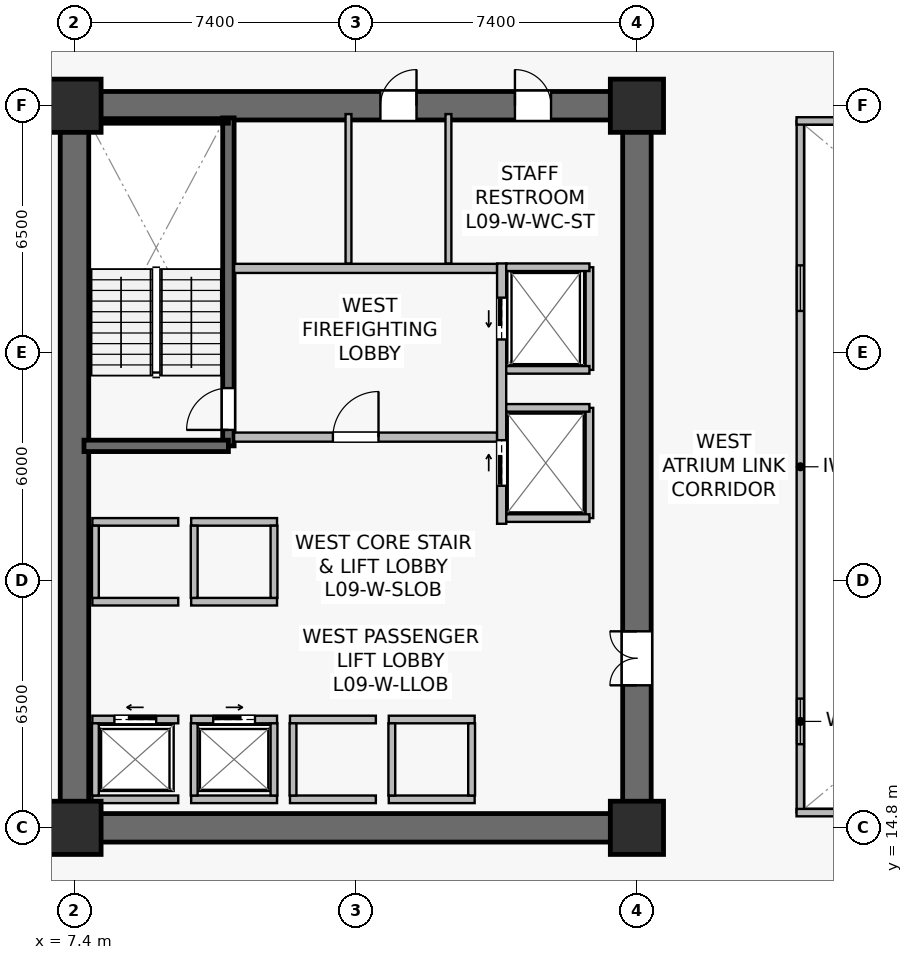
"""IFC4 building model, lengths in metres.
Left out: names, types, materials, properties, quantities, classifications, styles, units other than length and angle.
Written with IfcOpenShell. Run it as: python <this file> out.ifc"""

import sys

from ifc_helpers import new_model, si_unit, direction, frame, frame_2d, origin, origin_2d, place, context, subcontext, project, spatial, rectangle, extrude, source, transform, mapped, element, fill, save


model = new_model("IFC4")
c1 = context("Model", 3, precision=1e-05, world=origin(), true_north=direction((0.0, 1.0)))
c2 = subcontext(c1, "Body", "Model", "MODEL_VIEW")
j1 = project(units=[si_unit("LENGTHUNIT", "METRE"), si_unit("PLANEANGLEUNIT", "RADIAN")], contexts=[c1])
p1 = place(None, origin())
s1 = spatial("IfcSite", under=j1, at=p1, CompositionType="ELEMENT")
p2 = place(p1, origin())
s2 = spatial("IfcBuilding", under=s1, at=p2, CompositionType="ELEMENT")
p3 = place(p2, frame((0.0, 0.0, 37.5)))
s3 = spatial("IfcBuildingStorey", under=s2, at=p3, CompositionType="ELEMENT", Elevation=37.5)
p4 = place(p3, frame((7.025, 14.8, 0.0), z_axis=(0.0, 0.0, 1.0), x_axis=(1.0, 0.0, 0.0)))
e1 = element("IfcWall", 1, at=p4, inside=s3, PredefinedType="SHEAR", context=c2, shape_type="SweptSolid", body=[
    extrude(rectangle(XDim=15.55, YDim=0.75, at=frame_2d((7.775, 0.0))), origin(), (0.0, 0.0, 1.0), 3.78),
])
p5 = place(p3, frame((7.025, 33.8, 0.0), z_axis=(0.0, 0.0, 1.0), x_axis=(1.0, 0.0, 0.0)))
e2 = element("IfcWall", 2, at=p5, inside=s3, PredefinedType="SHEAR", context=c2, shape_type="SweptSolid", body=[
    extrude(rectangle(XDim=15.55, YDim=0.75, at=frame_2d((7.775, 0.0))), origin(), (0.0, 0.0, 1.0), 3.78),
])
p6 = place(p5, frame((8.425, 0.0, 0.0)))
e3 = element("IfcOpeningElement", 3, at=p6, cuts=e2, PredefinedType="OPENING", context=c2, shape_type="SweptSolid", body=[
    extrude(rectangle(XDim=0.95, YDim=2.15, at=frame_2d((0.475, 1.075))), frame((0.0, 0.385, 0.0), z_axis=(0.0, -1.0, 0.0), x_axis=(1.0, 0.0, 0.0)), (0.0, 0.0, 1.0), 0.77),
])
p7 = place(p5, frame((11.965, 0.0, 0.0)))
e4 = element("IfcOpeningElement", 4, at=p7, cuts=e2, PredefinedType="OPENING", context=c2, shape_type="SweptSolid", body=[
    extrude(rectangle(XDim=0.95, YDim=2.15, at=frame_2d((0.475, 1.075))), frame((0.0, 0.385, 0.0), z_axis=(0.0, -1.0, 0.0), x_axis=(1.0, 0.0, 0.0)), (0.0, 0.0, 1.0), 0.77),
])
p8 = place(p3, frame((7.4, 15.175, 0.0), z_axis=(0.0, 0.0, 1.0), x_axis=(0.0, 1.0, 0.0)))
e5 = element("IfcWall", 5, at=p8, inside=s3, PredefinedType="SHEAR", context=c2, shape_type="SweptSolid", body=[
    extrude(rectangle(XDim=18.25, YDim=0.75, at=frame_2d((9.125, 0.0))), origin(), (0.0, 0.0, 1.0), 3.78),
])
p9 = place(p3, frame((22.2, 15.175, 0.0), z_axis=(0.0, 0.0, 1.0), x_axis=(0.0, 1.0, 0.0)))
e6 = element("IfcWall", 6, at=p9, inside=s3, PredefinedType="SHEAR", context=c2, shape_type="SweptSolid", body=[
    extrude(rectangle(XDim=18.25, YDim=0.75, at=frame_2d((9.125, 0.0))), origin(), (0.0, 0.0, 1.0), 3.78),
])
p10 = place(p9, frame((3.375, 0.0, 0.0)))
e7 = element("IfcOpeningElement", 7, at=p10, cuts=e6, PredefinedType="OPENING", context=c2, shape_type="SweptSolid", body=[
    extrude(rectangle(XDim=1.42, YDim=2.2, at=frame_2d((0.71, 1.1))), frame((0.0, 0.385, 0.0), z_axis=(0.0, -1.0, 0.0), x_axis=(1.0, 0.0, 0.0)), (0.0, 0.0, 1.0), 0.77),
])
p11 = place(p3, frame((11.45, 24.85, 0.0), z_axis=(0.0, 0.0, 1.0), x_axis=(0.0, 1.0, 0.0)))
e8 = element("IfcWall", 8, at=p11, inside=s3, PredefinedType="SHEAR", context=c2, shape_type="SweptSolid", body=[
    extrude(rectangle(XDim=8.63, YDim=0.3, at=frame_2d((4.315, 0.0))), origin(), (0.0, 0.0, 1.0), 3.78),
])
p12 = place(p11, frame((0.42, 0.0, 0.0)))
e9 = element("IfcOpeningElement", 9, at=p12, cuts=e8, PredefinedType="OPENING", context=c2, shape_type="SweptSolid", body=[
    extrude(rectangle(XDim=1.1, YDim=2.15, at=frame_2d((0.55, 1.075))), frame((0.0, 0.16, 0.0), z_axis=(0.0, -1.0, 0.0), x_axis=(1.0, 0.0, 0.0)), (0.0, 0.0, 1.0), 0.32),
])
p13 = place(p3, frame((7.65, 24.85, 0.0), z_axis=(0.0, 0.0, 1.0), x_axis=(1.0, 0.0, 0.0)))
e10 = element("IfcWall", 10, at=p13, inside=s3, PredefinedType="SHEAR", context=c2, shape_type="SweptSolid", body=[
    extrude(rectangle(XDim=3.8, YDim=0.3, at=frame_2d((1.9, 0.0))), origin(), (0.0, 0.0, 1.0), 3.78),
])
p14 = place(p3, frame((7.73, 33.4, 0.0), z_axis=(0.0, 0.0, 1.0), x_axis=(1.0, 0.0, 0.0)))
e11 = element("IfcWall", 11, at=p14, inside=s3, PredefinedType="SOLIDWALL", context=c2, shape_type="SweptSolid", body=[
    extrude(rectangle(XDim=3.72, YDim=0.12, at=frame_2d((1.86, 0.0))), origin(), (0.0, 0.0, 1.0), 3.78),
])
m1 = source(origin(), c2, "Body", "SweptSolid", [
    extrude(rectangle(XDim=1.4, YDim=1.4, at=origin_2d()), origin(), (0.0, 0.0, 1.0), 4.1),
])
for number, where, z_axis, x_axis in (
    (12, (7.4, 14.8, 0.0), (0.0, 0.0, 1.0), (1.0, 0.0, 0.0)),
    (13, (22.2, 14.8, 0.0), (0.0, 0.0, 1.0), (1.0, 0.0, 0.0)),
    (14, (7.4, 33.8, 0.0), (0.0, 0.0, 1.0), (1.0, 0.0, 0.0)),
    (15, (22.2, 33.8, 0.0), (0.0, 0.0, 1.0), (1.0, 0.0, 0.0)),
):
    element("IfcColumn", number, at=place(p3, frame(where, z_axis=z_axis, x_axis=x_axis)), inside=s3, PredefinedType="COLUMN", context=c2, shape_type="MappedRepresentation", body=[
        mapped(m1, transform((0.0, 0.0, 0.0), scale=1.0)),
    ])
p15 = place(p3, frame((11.6, 25.08, 0.0), z_axis=(0.0, 0.0, 1.0), x_axis=(1.0, 0.0, 0.0)))
e16 = element("IfcWall", 16, at=p15, inside=s3, PredefinedType="SOLIDWALL", context=c2, shape_type="SweptSolid", body=[
    extrude(rectangle(XDim=6.92, YDim=0.24, at=frame_2d((3.46, 0.0))), origin(), (0.0, 0.0, 1.0), 3.065),
])
p16 = place(p15, frame((2.6, 0.0, 0.0)))
e17 = element("IfcOpeningElement", 17, at=p16, cuts=e16, PredefinedType="OPENING", context=c2, shape_type="SweptSolid", body=[
    extrude(rectangle(XDim=1.2, YDim=2.16, at=frame_2d((0.6, 1.08))), frame((0.0, 0.13, 0.0), z_axis=(0.0, -1.0, 0.0), x_axis=(1.0, 0.0, 0.0)), (0.0, 0.0, 1.0), 0.26),
])
p17 = place(p3, frame((11.6, 29.52, 0.0), z_axis=(0.0, 0.0, 1.0), x_axis=(1.0, 0.0, 0.0)))
e18 = element("IfcWall", 18, at=p17, inside=s3, PredefinedType="SOLIDWALL", context=c2, shape_type="SweptSolid", body=[
    extrude(rectangle(XDim=6.92, YDim=0.24, at=frame_2d((3.46, 0.0))), origin(), (0.0, 0.0, 1.0), 3.065),
])
p18 = place(p3, frame((18.64, 22.8, 0.0), z_axis=(0.0, 0.0, 1.0), x_axis=(0.0, 1.0, 0.0)))
e19 = element("IfcWall", 19, at=p18, inside=s3, PredefinedType="SOLIDWALL", context=c2, shape_type="SweptSolid", body=[
    extrude(rectangle(XDim=6.85, YDim=0.24, at=frame_2d((3.425, 0.0))), origin(), (0.0, 0.0, 1.0), 2.865),
])
p19 = place(p18, frame((4.85, 0.0, 0.0)))
e20 = element("IfcOpeningElement", 20, at=p19, cuts=e19, PredefinedType="OPENING", context=c2, shape_type="SweptSolid", body=[
    extrude(rectangle(XDim=1.1, YDim=2.22, at=frame_2d((0.55, 1.11))), frame((0.0, 0.13, 0.0), z_axis=(0.0, -1.0, 0.0), x_axis=(1.0, 0.0, 0.0)), (0.0, 0.0, 1.0), 0.26),
])
p20 = place(p18, frame((1.0, 0.0, 0.0)))
e21 = element("IfcOpeningElement", 21, at=p20, cuts=e19, PredefinedType="OPENING", context=c2, shape_type="SweptSolid", body=[
    extrude(rectangle(XDim=1.2, YDim=2.22, at=frame_2d((0.6, 1.11))), frame((0.0, 0.13, 0.0), z_axis=(0.0, -1.0, 0.0), x_axis=(1.0, 0.0, 0.0)), (0.0, 0.0, 1.0), 0.26),
])
p21 = place(p3, frame((7.87, 17.65, 0.0), z_axis=(0.0, 0.0, 1.0), x_axis=(1.0, 0.0, 0.0)))
e22 = element("IfcWall", 22, at=p21, inside=s3, PredefinedType="SOLIDWALL", context=c2, shape_type="SweptSolid", body=[
    extrude(rectangle(XDim=2.26, YDim=0.2, at=frame_2d((1.13, 0.0))), origin(), (0.0, 0.0, 1.0), 3.78),
])
p22 = place(p21, frame((0.58, 0.0, 0.0)))
e23 = element("IfcOpeningElement", 23, at=p22, cuts=e22, PredefinedType="OPENING", context=c2, shape_type="SweptSolid", body=[
    extrude(rectangle(XDim=1.1, YDim=2.22, at=frame_2d((0.55, 1.11))), frame((0.0, 0.11, 0.0), z_axis=(0.0, -1.0, 0.0), x_axis=(1.0, 0.0, 0.0)), (0.0, 0.0, 1.0), 0.22),
])
p23 = place(p3, frame((7.87, 15.55, 0.0), z_axis=(0.0, 0.0, 1.0), x_axis=(1.0, 0.0, 0.0)))
e24 = element("IfcWall", 24, at=p23, inside=s3, PredefinedType="SOLIDWALL", context=c2, shape_type="SweptSolid", body=[
    extrude(rectangle(XDim=2.26, YDim=0.2, at=frame_2d((1.13, 0.0))), origin(), (0.0, 0.0, 1.0), 3.78),
])
p24 = place(p3, frame((7.95, 15.65, 0.0), z_axis=(0.0, 0.0, 1.0), x_axis=(0.0, 1.0, 0.0)))
e25 = element("IfcWall", 25, at=p24, inside=s3, PredefinedType="SOLIDWALL", context=c2, shape_type="SweptSolid", body=[
    extrude(rectangle(XDim=1.9, YDim=0.18, at=frame_2d((0.95, 0.0))), origin(), (0.0, 0.0, 1.0), 3.78),
])
p25 = place(p3, frame((10.47, 17.65, 0.0), z_axis=(0.0, 0.0, 1.0), x_axis=(1.0, 0.0, 0.0)))
e26 = element("IfcWall", 26, at=p25, inside=s3, PredefinedType="SOLIDWALL", context=c2, shape_type="SweptSolid", body=[
    extrude(rectangle(XDim=2.26, YDim=0.2, at=frame_2d((1.13, 0.0))), origin(), (0.0, 0.0, 1.0), 3.78),
])
p26 = place(p25, frame((0.58, 0.0, 0.0)))
e27 = element("IfcOpeningElement", 27, at=p26, cuts=e26, PredefinedType="OPENING", context=c2, shape_type="SweptSolid", body=[
    extrude(rectangle(XDim=1.1, YDim=2.22, at=frame_2d((0.55, 1.11))), frame((0.0, 0.11, 0.0), z_axis=(0.0, -1.0, 0.0), x_axis=(1.0, 0.0, 0.0)), (0.0, 0.0, 1.0), 0.22),
])
p27 = place(p3, frame((10.47, 15.55, 0.0), z_axis=(0.0, 0.0, 1.0), x_axis=(1.0, 0.0, 0.0)))
e28 = element("IfcWall", 28, at=p27, inside=s3, PredefinedType="SOLIDWALL", context=c2, shape_type="SweptSolid", body=[
    extrude(rectangle(XDim=2.26, YDim=0.2, at=frame_2d((1.13, 0.0))), origin(), (0.0, 0.0, 1.0), 3.78),
])
for number, where, z_axis, x_axis in (
    (29, (10.55, 15.65, 0.0), (0.0, 0.0, 1.0), (0.0, 1.0, 0.0)),
    (30, (12.65, 15.65, 0.0), (0.0, 0.0, 1.0), (0.0, 1.0, 0.0)),
):
    element("IfcWall", number, at=place(p3, frame(where, z_axis=z_axis, x_axis=x_axis)), inside=s3, PredefinedType="SOLIDWALL", context=c2, shape_type="SweptSolid", body=[
        extrude(rectangle(XDim=1.9, YDim=0.18, at=frame_2d((0.95, 0.0))), origin(), (0.0, 0.0, 1.0), 3.78),
    ])
for number, where, z_axis, x_axis in (
    (31, (13.07, 17.65, 0.0), (0.0, 0.0, 1.0), (1.0, 0.0, 0.0)),
    (32, (13.07, 15.55, 0.0), (0.0, 0.0, 1.0), (1.0, 0.0, 0.0)),
):
    element("IfcWall", number, at=place(p3, frame(where, z_axis=z_axis, x_axis=x_axis)), inside=s3, PredefinedType="SOLIDWALL", context=c2, shape_type="SweptSolid", body=[
        extrude(rectangle(XDim=2.26, YDim=0.2, at=frame_2d((1.13, 0.0))), origin(), (0.0, 0.0, 1.0), 3.065),
    ])
p28 = place(p3, frame((13.15, 15.65, 0.0), z_axis=(0.0, 0.0, 1.0), x_axis=(0.0, 1.0, 0.0)))
e33 = element("IfcWall", 33, at=p28, inside=s3, PredefinedType="SOLIDWALL", context=c2, shape_type="SweptSolid", body=[
    extrude(rectangle(XDim=1.9, YDim=0.18, at=frame_2d((0.95, 0.0))), origin(), (0.0, 0.0, 1.0), 3.78),
])
for number, where, z_axis, x_axis in (
    (34, (15.67, 17.65, 0.0), (0.0, 0.0, 1.0), (1.0, 0.0, 0.0)),
    (35, (15.67, 15.55, 0.0), (0.0, 0.0, 1.0), (1.0, 0.0, 0.0)),
):
    element("IfcWall", number, at=place(p3, frame(where, z_axis=z_axis, x_axis=x_axis)), inside=s3, PredefinedType="SOLIDWALL", context=c2, shape_type="SweptSolid", body=[
        extrude(rectangle(XDim=2.26, YDim=0.2, at=frame_2d((1.13, 0.0))), origin(), (0.0, 0.0, 1.0), 3.78),
    ])
for number, where, z_axis, x_axis in (
    (36, (15.75, 15.65, 0.0), (0.0, 0.0, 1.0), (0.0, 1.0, 0.0)),
    (37, (17.85, 15.65, 0.0), (0.0, 0.0, 1.0), (0.0, 1.0, 0.0)),
):
    element("IfcWall", number, at=place(p3, frame(where, z_axis=z_axis, x_axis=x_axis)), inside=s3, PredefinedType="SOLIDWALL", context=c2, shape_type="SweptSolid", body=[
        extrude(rectangle(XDim=1.9, YDim=0.18, at=frame_2d((0.95, 0.0))), origin(), (0.0, 0.0, 1.0), 3.78),
    ])
for number, where, z_axis, x_axis in (
    (38, (7.87, 20.75, 0.0), (0.0, 0.0, 1.0), (1.0, 0.0, 0.0)),
    (39, (7.87, 22.85, 0.0), (0.0, 0.0, 1.0), (1.0, 0.0, 0.0)),
):
    element("IfcWall", number, at=place(p3, frame(where, z_axis=z_axis, x_axis=x_axis)), inside=s3, PredefinedType="SOLIDWALL", context=c2, shape_type="SweptSolid", body=[
        extrude(rectangle(XDim=2.26, YDim=0.2, at=frame_2d((1.13, 0.0))), origin(), (0.0, 0.0, 1.0), 3.78),
    ])
p29 = place(p3, frame((7.95, 20.85, 0.0), z_axis=(0.0, 0.0, 1.0), x_axis=(0.0, 1.0, 0.0)))
e40 = element("IfcWall", 40, at=p29, inside=s3, PredefinedType="SOLIDWALL", context=c2, shape_type="SweptSolid", body=[
    extrude(rectangle(XDim=1.9, YDim=0.18, at=frame_2d((0.95, 0.0))), origin(), (0.0, 0.0, 1.0), 3.78),
])
for number, where, z_axis, x_axis in (
    (41, (10.47, 20.75, 0.0), (0.0, 0.0, 1.0), (1.0, 0.0, 0.0)),
    (42, (10.47, 22.85, 0.0), (0.0, 0.0, 1.0), (1.0, 0.0, 0.0)),
):
    element("IfcWall", number, at=place(p3, frame(where, z_axis=z_axis, x_axis=x_axis)), inside=s3, PredefinedType="SOLIDWALL", context=c2, shape_type="SweptSolid", body=[
        extrude(rectangle(XDim=2.26, YDim=0.2, at=frame_2d((1.13, 0.0))), origin(), (0.0, 0.0, 1.0), 3.78),
    ])
for number, where, z_axis, x_axis in (
    (43, (10.55, 20.85, 0.0), (0.0, 0.0, 1.0), (0.0, 1.0, 0.0)),
    (44, (12.65, 20.85, 0.0), (0.0, 0.0, 1.0), (0.0, 1.0, 0.0)),
):
    element("IfcWall", number, at=place(p3, frame(where, z_axis=z_axis, x_axis=x_axis)), inside=s3, PredefinedType="SOLIDWALL", context=c2, shape_type="SweptSolid", body=[
        extrude(rectangle(XDim=1.9, YDim=0.18, at=frame_2d((0.95, 0.0))), origin(), (0.0, 0.0, 1.0), 3.78),
    ])
p30 = place(p3, frame((20.95, 26.85, 0.0), z_axis=(0.0, 0.0, 1.0), x_axis=(0.0, 1.0, 0.0)))
e45 = element("IfcWall", 45, at=p30, inside=s3, PredefinedType="SOLIDWALL", context=c2, shape_type="SweptSolid", body=[
    extrude(rectangle(XDim=2.7, YDim=0.2, at=frame_2d((1.35, 0.0))), origin(), (0.0, 0.0, 1.0), 3.78),
])
p31 = place(p3, frame((18.76, 29.55, 0.0), z_axis=(0.0, 0.0, 1.0), x_axis=(1.0, 0.0, 0.0)))
e46 = element("IfcWall", 46, at=p31, inside=s3, PredefinedType="SOLIDWALL", context=c2, shape_type="SweptSolid", body=[
    extrude(rectangle(XDim=2.19, YDim=0.2, at=frame_2d((1.095, 0.0))), origin(), (0.0, 0.0, 1.0), 3.78),
])
p32 = place(p3, frame((18.76, 26.85, 0.0), z_axis=(0.0, 0.0, 1.0), x_axis=(1.0, 0.0, 0.0)))
e47 = element("IfcWall", 47, at=p32, inside=s3, PredefinedType="SOLIDWALL", context=c2, shape_type="SweptSolid", body=[
    extrude(rectangle(XDim=2.19, YDim=0.2, at=frame_2d((1.095, 0.0))), origin(), (0.0, 0.0, 1.0), 3.177),
])
p33 = place(p3, frame((20.95, 22.95, 0.0), z_axis=(0.0, 0.0, 1.0), x_axis=(0.0, 1.0, 0.0)))
e48 = element("IfcWall", 48, at=p33, inside=s3, PredefinedType="SOLIDWALL", context=c2, shape_type="SweptSolid", body=[
    extrude(rectangle(XDim=2.9, YDim=0.2, at=frame_2d((1.45, 0.0))), origin(), (0.0, 0.0, 1.0), 2.865),
])
for number, where, z_axis, x_axis in (
    (49, (18.76, 25.85, 0.0), (0.0, 0.0, 1.0), (1.0, 0.0, 0.0)),
    (50, (18.76, 22.95, 0.0), (0.0, 0.0, 1.0), (1.0, 0.0, 0.0)),
):
    element("IfcWall", number, at=place(p3, frame(where, z_axis=z_axis, x_axis=x_axis)), inside=s3, PredefinedType="SOLIDWALL", context=c2, shape_type="SweptSolid", body=[
        extrude(rectangle(XDim=2.19, YDim=0.2, at=frame_2d((1.095, 0.0))), origin(), (0.0, 0.0, 1.0), 3.78),
    ])
p34 = place(p3, frame((14.61, 29.65, 0.0), z_axis=(0.0, 0.0, 1.0), x_axis=(0.0, 1.0, 0.0)))
e51 = element("IfcWall", 51, at=p34, inside=s3, PredefinedType="PLUMBINGWALL", context=c2, shape_type="SweptSolid", body=[
    extrude(rectangle(XDim=3.93, YDim=0.155, at=frame_2d((1.965, 0.0))), origin(), (0.0, 0.0, 1.0), 3.065),
])
p35 = place(p3, frame((17.24, 29.65, 0.0), z_axis=(0.0, 0.0, 1.0), x_axis=(0.0, 1.0, 0.0)))
e52 = element("IfcWall", 52, at=p35, inside=s3, PredefinedType="PLUMBINGWALL", context=c2, shape_type="SweptSolid", body=[
    extrude(rectangle(XDim=3.93, YDim=0.155, at=frame_2d((1.965, 0.0))), origin(), (0.0, 0.0, 1.0), 3.78),
])
p36 = place(p3, frame((26.5, 15.2, 0.0), z_axis=(0.0, 0.0, 1.0), x_axis=(0.0, 1.0, 0.0)))
e53 = element("IfcWall", 53, at=p36, inside=s3, PredefinedType="SOLIDWALL", context=c2, shape_type="SweptSolid", body=[
    extrude(rectangle(XDim=18.2, YDim=0.195, at=frame_2d((9.1, 0.0))), origin(), (0.0, 0.0, 1.0), 3.78),
])
p37 = place(p36, frame((1.8, 0.0, 0.9)))
e54 = element("IfcOpeningElement", 54, at=p37, cuts=e53, PredefinedType="OPENING", context=c2, shape_type="SweptSolid", body=[
    extrude(rectangle(XDim=1.2, YDim=1.35, at=frame_2d((0.6, 0.675))), frame((0.0, 0.107, 0.0), z_axis=(0.0, -1.0, 0.0), x_axis=(1.0, 0.0, 0.0)), (0.0, 0.0, 1.0), 0.215),
])
p38 = place(p36, frame((13.2, 0.0, 0.9)))
e55 = element("IfcOpeningElement", 55, at=p38, cuts=e53, PredefinedType="OPENING", context=c2, shape_type="SweptSolid", body=[
    extrude(rectangle(XDim=1.2, YDim=1.35, at=frame_2d((0.6, 0.675))), frame((0.0, 0.107, 0.0), z_axis=(0.0, -1.0, 0.0), x_axis=(1.0, 0.0, 0.0)), (0.0, 0.0, 1.0), 0.215),
])
for number, where, z_axis, x_axis in (
    (56, (26.4, 15.2, 0.0), (0.0, 0.0, 1.0), (1.0, 0.0, 0.0)),
    (57, (26.4, 33.4, 0.0), (0.0, 0.0, 1.0), (1.0, 0.0, 0.0)),
):
    element("IfcWall", number, at=place(p3, frame(where, z_axis=z_axis, x_axis=x_axis)), inside=s3, PredefinedType="SOLIDWALL", context=c2, shape_type="SweptSolid", body=[
        extrude(rectangle(XDim=22.0, YDim=0.195, at=frame_2d((11.0, 0.0))), origin(), (0.0, 0.0, 1.0), 3.78),
    ])
m2 = source(origin(), c2, "Body", "SweptSolid", [
    extrude(rectangle(XDim=1.2, YDim=1.35, at=frame_2d((0.6, 0.675))), frame((0.0, 0.03, 0.0), z_axis=(0.0, -1.0, 0.0), x_axis=(1.0, 0.0, 0.0)), (0.0, 0.0, 1.0), 0.06),
])
p39 = place(p37, origin())
e58 = element("IfcWindow", 58, at=p39, inside=s3, PartitioningType="SINGLE_PANEL", PredefinedType="WINDOW", context=c2, shape_type="MappedRepresentation", body=[
    mapped(m2, transform((0.0, 0.0, 0.0), scale=1.0)),
])
fill(e54, e58)
p40 = place(p38, origin())
e59 = element("IfcWindow", 59, at=p40, inside=s3, PartitioningType="SINGLE_PANEL", PredefinedType="WINDOW", context=c2, shape_type="MappedRepresentation", body=[
    mapped(m2, transform((0.0, 0.0, 0.0), scale=1.0)),
])
fill(e55, e59)
m3 = source(origin(), c2, "Body", "SweptSolid", [
    extrude(rectangle(XDim=1.1, YDim=2.15, at=frame_2d((0.55, 1.075))), frame((0.0, 0.025, 0.0), z_axis=(0.0, -1.0, 0.0), x_axis=(1.0, 0.0, 0.0)), (0.0, 0.0, 1.0), 0.05),
])
p41 = place(p12, origin())
e60 = element("IfcDoor", 60, at=p41, inside=s3, OperationType="SINGLE_SWING_LEFT", PredefinedType="DOOR", context=c2, shape_type="MappedRepresentation", body=[
    mapped(m3, transform((0.0, 0.0, 0.0), scale=1.0)),
])
fill(e9, e60)
m4 = source(origin(), c2, "Body", "SweptSolid", [
    extrude(rectangle(XDim=1.2, YDim=2.16, at=frame_2d((0.6, 1.08))), frame((0.0, 0.025, 0.0), z_axis=(0.0, -1.0, 0.0), x_axis=(1.0, 0.0, 0.0)), (0.0, 0.0, 1.0), 0.05),
])
p42 = place(p16, origin())
e61 = element("IfcDoor", 61, at=p42, inside=s3, OperationType="SINGLE_SWING_RIGHT", PredefinedType="DOOR", context=c2, shape_type="MappedRepresentation", body=[
    mapped(m4, transform((0.0, 0.0, 0.0), scale=1.0)),
])
fill(e17, e61)
m5 = source(origin(), c2, "Body", "SweptSolid", [
    extrude(rectangle(XDim=1.1, YDim=2.22, at=frame_2d((0.55, 1.11))), frame((0.0, 0.025, 0.0), z_axis=(0.0, -1.0, 0.0), x_axis=(1.0, 0.0, 0.0)), (0.0, 0.0, 1.0), 0.05),
])
p43 = place(p22, origin())
e62 = element("IfcDoor", 62, at=p43, inside=s3, OperationType="SLIDING_TO_LEFT", PredefinedType="USERDEFINED", context=c2, shape_type="MappedRepresentation", body=[
    mapped(m5, transform((0.0, 0.0, 0.0), scale=1.0)),
])
fill(e23, e62)
p44 = place(p26, origin())
e63 = element("IfcDoor", 63, at=p44, inside=s3, OperationType="SLIDING_TO_RIGHT", PredefinedType="USERDEFINED", context=c2, shape_type="MappedRepresentation", body=[
    mapped(m5, transform((0.0, 0.0, 0.0), scale=1.0)),
])
fill(e27, e63)
p45 = place(p19, origin())
e64 = element("IfcDoor", 64, at=p45, inside=s3, OperationType="SLIDING_TO_LEFT", PredefinedType="USERDEFINED", context=c2, shape_type="MappedRepresentation", body=[
    mapped(m5, transform((0.0, 0.0, 0.0), scale=1.0)),
])
fill(e20, e64)
m6 = source(origin(), c2, "Body", "SweptSolid", [
    extrude(rectangle(XDim=1.2, YDim=2.22, at=frame_2d((0.6, 1.11))), frame((0.0, 0.025, 0.0), z_axis=(0.0, -1.0, 0.0), x_axis=(1.0, 0.0, 0.0)), (0.0, 0.0, 1.0), 0.05),
])
p46 = place(p20, origin())
e65 = element("IfcDoor", 65, at=p46, inside=s3, OperationType="SLIDING_TO_RIGHT", PredefinedType="USERDEFINED", context=c2, shape_type="MappedRepresentation", body=[
    mapped(m6, transform((0.0, 0.0, 0.0), scale=1.0)),
])
fill(e21, e65)
m7 = source(origin(), c2, "Body", "SweptSolid", [
    extrude(rectangle(XDim=1.42, YDim=2.2, at=frame_2d((0.71, 1.1))), frame((0.0, 0.025, 0.0), z_axis=(0.0, -1.0, 0.0), x_axis=(1.0, 0.0, 0.0)), (0.0, 0.0, 1.0), 0.05),
])
p47 = place(p10, origin())
e66 = element("IfcDoor", 66, at=p47, inside=s3, OperationType="DOUBLE_DOOR_SINGLE_SWING", PredefinedType="DOOR", context=c2, shape_type="MappedRepresentation", body=[
    mapped(m7, transform((0.0, 0.0, 0.0), scale=1.0)),
])
fill(e7, e66)
m8 = source(origin(), c2, "Body", "SweptSolid", [
    extrude(rectangle(XDim=0.95, YDim=2.15, at=frame_2d((0.475, 1.075))), frame((0.0, 0.025, 0.0), z_axis=(0.0, -1.0, 0.0), x_axis=(1.0, 0.0, 0.0)), (0.0, 0.0, 1.0), 0.05),
])
p48 = place(p6, origin())
e67 = element("IfcDoor", 67, at=p48, inside=s3, OperationType="SINGLE_SWING_RIGHT", PredefinedType="DOOR", context=c2, shape_type="MappedRepresentation", body=[
    mapped(m8, transform((0.0, 0.0, 0.0), scale=1.0)),
])
fill(e3, e67)
p49 = place(p7, origin())
e68 = element("IfcDoor", 68, at=p49, inside=s3, OperationType="SINGLE_SWING_LEFT", PredefinedType="DOOR", context=c2, shape_type="MappedRepresentation", body=[
    mapped(m8, transform((0.0, 0.0, 0.0), scale=1.0)),
])
fill(e4, e68)
save(model, sys.argv[1])
